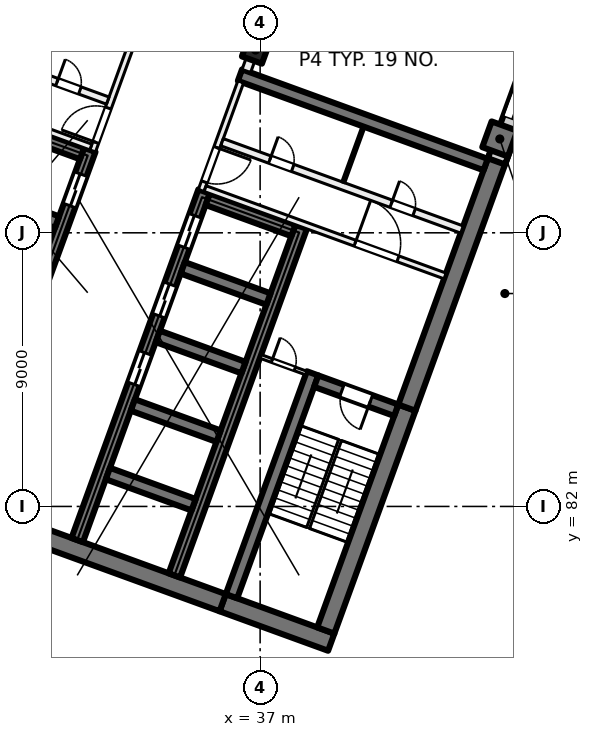
"""IFC4 building model, lengths in metres.
Left out: names, types, materials, properties, quantities, classifications, styles, units other than length and angle.
Written with IfcOpenShell. Run it as: python <this file> out.ifc"""

import sys

from ifc_helpers import new_model, si_unit, direction, frame, frame_2d, origin, origin_2d, place, context, subcontext, project, spatial, rectangle, extrude, element, fill, save


model = new_model("IFC4")
c1 = context("Model", 3, precision=1e-05, world=origin(), true_north=direction((0.0, 1.0)))
c2 = subcontext(c1, "Body", "Model", "MODEL_VIEW")
j1 = project(units=[si_unit("LENGTHUNIT", "METRE"), si_unit("PLANEANGLEUNIT", "RADIAN")], contexts=[c1])
p1 = place(None, origin())
s1 = spatial("IfcSite", under=j1, at=p1, CompositionType="ELEMENT")
p2 = place(p1, origin())
s2 = spatial("IfcBuilding", under=s1, at=p2, CompositionType="ELEMENT")
p3 = place(p2, frame((0.0, 0.0, 63.5)))
s3 = spatial("IfcBuildingStorey", under=s2, at=p3, CompositionType="ELEMENT", Elevation=63.5)
p4 = place(p3, frame((36.849, 97.011, 0.0), z_axis=(0.0, 0.0, 1.0), x_axis=(-0.342020143326, -0.939692620786, 0.0)))
e1 = element("IfcColumn", 1, at=p4, inside=s3, PredefinedType="COLUMN", context=c2, shape_type="SweptSolid", body=[
    extrude(rectangle(XDim=0.7, YDim=0.7, at=origin_2d()), origin(), (0.0, 0.0, 1.0), 4.0),
])
p5 = place(p3, frame((44.884, 94.087, 0.0), z_axis=(0.0, 0.0, 1.0), x_axis=(-0.342020143326, -0.939692620786, 0.0)))
e2 = element("IfcColumn", 2, at=p5, inside=s3, PredefinedType="COLUMN", context=c2, shape_type="SweptSolid", body=[
    extrude(rectangle(XDim=0.9, YDim=0.9, at=origin_2d()), origin(), (0.0, 0.0, 1.0), 4.0),
])
p6 = place(p3, frame((39.338, 77.535, 0.0), z_axis=(0.0, 0.0, 1.0), x_axis=(-0.939701471648, 0.341995824804, 0.0)))
e3 = element("IfcWall", 3, at=p6, inside=s3, PredefinedType="SHEAR", context=c2, shape_type="SweptSolid", body=[
    extrude(rectangle(XDim=3.8, YDim=0.6, at=frame_2d((1.9, 0.0))), origin(), (0.0, 0.0, 1.0), 4.0),
])
p7 = place(p3, frame((35.767, 78.835, 0.0), z_axis=(0.0, 0.0, 1.0), x_axis=(-0.939692894512, 0.342019391267, 0.0)))
e4 = element("IfcWall", 4, at=p7, inside=s3, PredefinedType="SHEAR", context=c2, shape_type="SweptSolid", body=[
    extrude(rectangle(XDim=14.4, YDim=0.6, at=frame_2d((7.2, 0.0))), origin(), (0.0, 0.0, 1.0), 4.0),
])
p8 = place(p3, frame((39.159, 77.92, 0.0), z_axis=(0.0, 0.0, 1.0), x_axis=(0.342016982193, 0.939693771338, 0.0)))
e5 = element("IfcWall", 5, at=p8, inside=s3, PredefinedType="SHEAR", context=c2, shape_type="SweptSolid", body=[
    extrude(rectangle(XDim=7.8, YDim=0.6, at=frame_2d((3.9, 0.0))), origin(), (0.0, 0.0, 1.0), 4.0),
])
p9 = place(p3, frame((41.827, 85.249, 0.0), z_axis=(0.0, 0.0, 1.0), x_axis=(0.342016162452, 0.939694069696, 0.0)))
e6 = element("IfcWall", 6, at=p9, inside=s3, PredefinedType="SHEAR", context=c2, shape_type="SweptSolid", body=[
    extrude(rectangle(XDim=8.9, YDim=0.6, at=frame_2d((4.45, 0.0))), origin(), (0.0, 0.0, 1.0), 4.0),
])
p10 = place(p3, frame((36.058, 79.048, 0.0), z_axis=(0.0, 0.0, 1.0), x_axis=(0.342016982193, 0.939693771338, 0.0)))
e7 = element("IfcWall", 7, at=p10, inside=s3, PredefinedType="SHEAR", context=c2, shape_type="SweptSolid", body=[
    extrude(rectangle(XDim=7.8, YDim=0.4, at=frame_2d((3.9, 0.0))), origin(), (0.0, 0.0, 1.0), 4.0),
])
p11 = place(p3, frame((41.476, 85.164, 0.0), z_axis=(0.0, 0.0, 1.0), x_axis=(-0.939678810556, 0.342058084236, 0.0)))
e8 = element("IfcWall", 8, at=p11, inside=s3, PredefinedType="SHEAR", context=c2, shape_type="SweptSolid", body=[
    extrude(rectangle(XDim=2.8, YDim=0.4, at=frame_2d((1.4, 0.0))), origin(), (0.0, 0.0, 1.0), 4.0),
])
p12 = place(p11, frame((0.9, 0.0, 0.0)))
e9 = element("IfcOpeningElement", 9, at=p12, cuts=e8, PredefinedType="OPENING", context=c2, shape_type="SweptSolid", body=[
    extrude(rectangle(XDim=1.0, YDim=2.1, at=frame_2d((0.5, 1.05))), frame((0.0, 0.21, 0.0), z_axis=(0.0, -1.0, 0.0), x_axis=(1.0, 0.0, 0.0)), (0.0, 0.0, 1.0), 0.42),
])
p13 = place(p3, frame((30.984, 80.895, 0.0), z_axis=(0.0, 0.0, 1.0), x_axis=(0.342021021735, 0.939692301071, 0.0)))
e10 = element("IfcWall", 10, at=p13, inside=s3, PredefinedType="SHEAR", context=c2, shape_type="SweptSolid", body=[
    extrude(rectangle(XDim=12.2, YDim=0.4, at=frame_2d((6.1, 0.0))), origin(), (0.0, 0.0, 1.0), 4.0),
])
p14 = place(p13, frame((5.45, 0.0, 0.0)))
e11 = element("IfcOpeningElement", 11, at=p14, cuts=e10, PredefinedType="OPENING", context=c2, shape_type="SweptSolid", body=[
    extrude(rectangle(XDim=1.1, YDim=2.1, at=frame_2d((0.55, 1.05))), frame((0.0, 0.21, 0.0), z_axis=(0.0, -1.0, 0.0), x_axis=(1.0, 0.0, 0.0)), (0.0, 0.0, 1.0), 0.42),
])
p15 = place(p13, frame((7.85, 0.0, 0.0)))
e12 = element("IfcOpeningElement", 12, at=p15, cuts=e10, PredefinedType="OPENING", context=c2, shape_type="SweptSolid", body=[
    extrude(rectangle(XDim=1.1, YDim=2.1, at=frame_2d((0.55, 1.05))), frame((0.0, 0.21, 0.0), z_axis=(0.0, -1.0, 0.0), x_axis=(1.0, 0.0, 0.0)), (0.0, 0.0, 1.0), 0.42),
])
p16 = place(p13, frame((10.25, 0.0, 0.0)))
e13 = element("IfcOpeningElement", 13, at=p16, cuts=e10, PredefinedType="OPENING", context=c2, shape_type="SweptSolid", body=[
    extrude(rectangle(XDim=1.1, YDim=2.1, at=frame_2d((0.55, 1.05))), frame((0.0, 0.21, 0.0), z_axis=(0.0, -1.0, 0.0), x_axis=(1.0, 0.0, 0.0)), (0.0, 0.0, 1.0), 0.42),
])
p17 = place(p3, frame((34.178, 79.732, 0.0), z_axis=(0.0, 0.0, 1.0), x_axis=(0.342014590177, 0.939694641948, 0.0)))
e14 = element("IfcWall", 14, at=p17, inside=s3, PredefinedType="SHEAR", context=c2, shape_type="SweptSolid", body=[
    extrude(rectangle(XDim=12.2, YDim=0.4, at=frame_2d((6.1, 0.0))), origin(), (0.0, 0.0, 1.0), 4.0),
])
for number, where, z_axis, x_axis in (
    (15, (34.812, 82.056, 0.0), (0.0, 0.0, 1.0), (-0.94, 0.342, 0.0)),
    (16, (35.632, 84.311, 0.0), (0.0, 0.0, 1.0), (-0.94, 0.342, 0.0)),
    (17, (36.453, 86.566, 0.0), (0.0, 0.0, 1.0), (-0.94, 0.342, 0.0)),
    (18, (37.274, 88.822, 0.0), (0.0, 0.0, 1.0), (-0.94, 0.342, 0.0)),
):
    element("IfcWall", number, at=place(p3, frame(where, z_axis=z_axis, x_axis=x_axis)), inside=s3, PredefinedType="SHEAR", context=c2, shape_type="SweptSolid", body=[
        extrude(rectangle(XDim=3.0, YDim=0.4, at=frame_2d((1.5, 0.0))), origin(), (0.0, 0.0, 1.0), 4.0),
    ])
p18 = place(p3, frame((38.095, 91.077, 0.0), z_axis=(0.0, 0.0, 1.0), x_axis=(-0.939676934218, 0.342063238742, 0.0)))
e19 = element("IfcWall", 19, at=p18, inside=s3, PredefinedType="SHEAR", context=c2, shape_type="SweptSolid", body=[
    extrude(rectangle(XDim=3.0, YDim=0.4, at=frame_2d((1.5, 0.0))), origin(), (0.0, 0.0, 1.0), 4.0),
])
p19 = place(p3, frame((27.225, 82.263, 0.0), z_axis=(0.0, 0.0, 1.0), x_axis=(0.342014590177, 0.939694641948, 0.0)))
e20 = element("IfcWall", 20, at=p19, inside=s3, PredefinedType="SHEAR", context=c2, shape_type="SweptSolid", body=[
    extrude(rectangle(XDim=12.2, YDim=0.4, at=frame_2d((6.1, 0.0))), origin(), (0.0, 0.0, 1.0), 4.0),
])
p20 = place(p19, frame((10.25, 0.0, 0.0)))
e21 = element("IfcOpeningElement", 21, at=p20, cuts=e20, PredefinedType="OPENING", context=c2, shape_type="SweptSolid", body=[
    extrude(rectangle(XDim=1.1, YDim=2.1, at=frame_2d((0.55, 1.05))), frame((0.0, 0.21, 0.0), z_axis=(0.0, -1.0, 0.0), x_axis=(1.0, 0.0, 0.0)), (0.0, 0.0, 1.0), 0.42),
])
p21 = place(p19, frame((0.7, 0.0, 0.0)))
e22 = element("IfcOpeningElement", 22, at=p21, cuts=e20, PredefinedType="OPENING", context=c2, shape_type="SweptSolid", body=[
    extrude(rectangle(XDim=0.8, YDim=2.1, at=frame_2d((0.4, 1.05))), frame((0.0, 0.21, 0.0), z_axis=(0.0, -1.0, 0.0), x_axis=(1.0, 0.0, 0.0)), (0.0, 0.0, 1.0), 0.42),
])
for number, where, z_axis, x_axis in (
    (23, (30.32, 91.353, 0.0), (0.0, 0.0, 1.0), (-0.94, 0.342, 0.0)),
    (24, (31.141, 93.608, 0.0), (0.0, 0.0, 1.0), (-0.94, 0.342, 0.0)),
):
    element("IfcWall", number, at=place(p3, frame(where, z_axis=z_axis, x_axis=x_axis)), inside=s3, PredefinedType="SHEAR", context=c2, shape_type="SweptSolid", body=[
        extrude(rectangle(XDim=3.0, YDim=0.4, at=frame_2d((1.5, 0.0))), origin(), (0.0, 0.0, 1.0), 4.0),
    ])
p22 = place(p3, frame((44.418, 93.245, 0.0), z_axis=(0.0, 0.0, 1.0), x_axis=(-0.93969060187, 0.342025690201, 0.0)))
e25 = element("IfcWall", 25, at=p22, inside=s3, PredefinedType="SHEAR", context=c2, shape_type="SweptSolid", body=[
    extrude(rectangle(XDim=8.6, YDim=0.4, at=frame_2d((4.3, 0.0))), origin(), (0.0, 0.0, 1.0), 4.0),
])
p23 = place(p3, frame((52.212, 113.783, 0.0), z_axis=(0.0, 0.0, 1.0), x_axis=(-0.34202521188, -0.939690775968, 0.0)))
e26 = element("IfcWall", 26, at=p23, inside=s3, PredefinedType="SOLIDWALL", context=c2, shape_type="SweptSolid", body=[
    extrude(rectangle(XDim=21.745, YDim=0.6, at=frame_2d((10.873, 0.0))), origin(), (0.0, 0.0, 1.0), 3.625),
])
p24 = place(p23, frame((3.765, 0.0, 0.9)))
e27 = element("IfcOpeningElement", 27, at=p24, cuts=e26, PredefinedType="OPENING", context=c2, shape_type="SweptSolid", body=[
    extrude(rectangle(XDim=3.0, YDim=2.4, at=frame_2d((1.5, 1.2))), frame((0.0, 0.31, 0.0), z_axis=(0.0, -1.0, 0.0), x_axis=(1.0, 0.0, 0.0)), (0.0, 0.0, 1.0), 0.62),
])
p25 = place(p23, frame((8.265, 0.0, 0.9)))
e28 = element("IfcOpeningElement", 28, at=p25, cuts=e26, PredefinedType="OPENING", context=c2, shape_type="SweptSolid", body=[
    extrude(rectangle(XDim=3.0, YDim=2.4, at=frame_2d((1.5, 1.2))), frame((0.0, 0.31, 0.0), z_axis=(0.0, -1.0, 0.0), x_axis=(1.0, 0.0, 0.0)), (0.0, 0.0, 1.0), 0.62),
])
p26 = place(p23, frame((12.765, 0.0, 0.9)))
e29 = element("IfcOpeningElement", 29, at=p26, cuts=e26, PredefinedType="OPENING", context=c2, shape_type="SweptSolid", body=[
    extrude(rectangle(XDim=3.0, YDim=2.4, at=frame_2d((1.5, 1.2))), frame((0.0, 0.31, 0.0), z_axis=(0.0, -1.0, 0.0), x_axis=(1.0, 0.0, 0.0)), (0.0, 0.0, 1.0), 0.62),
])
p27 = place(p23, frame((17.265, 0.0, 0.9)))
e30 = element("IfcOpeningElement", 30, at=p27, cuts=e26, PredefinedType="OPENING", context=c2, shape_type="SweptSolid", body=[
    extrude(rectangle(XDim=3.0, YDim=2.4, at=frame_2d((1.5, 1.2))), frame((0.0, 0.31, 0.0), z_axis=(0.0, -1.0, 0.0), x_axis=(1.0, 0.0, 0.0)), (0.0, 0.0, 1.0), 0.62),
])
p28 = place(p3, frame((31.491, 93.693, 0.0), z_axis=(0.0, 0.0, 1.0), x_axis=(0.341995824804, 0.939701471648, 0.0)))
e31 = element("IfcWall", 31, at=p28, inside=s3, PredefinedType="PARTITIONING", context=c2, shape_type="SweptSolid", body=[
    extrude(rectangle(XDim=3.8, YDim=0.2, at=frame_2d((1.9, 0.0))), origin(), (0.0, 0.0, 1.0), 3.625),
])
p29 = place(p28, frame((0.3, 0.0, 0.0)))
e32 = element("IfcOpeningElement", 32, at=p29, cuts=e31, PredefinedType="OPENING", context=c2, shape_type="SweptSolid", body=[
    extrude(rectangle(XDim=1.2, YDim=2.1, at=frame_2d((0.6, 1.05))), frame((0.0, 0.11, 0.0), z_axis=(0.0, -1.0, 0.0), x_axis=(1.0, 0.0, 0.0)), (0.0, 0.0, 1.0), 0.22),
])
p30 = place(p3, frame((23.538, 96.694, 0.0), z_axis=(0.0, 0.0, 1.0), x_axis=(0.939691552312, -0.342023078919, 0.0)))
e33 = element("IfcWall", 33, at=p30, inside=s3, PredefinedType="PARTITIONING", context=c2, shape_type="SweptSolid", body=[
    extrude(rectangle(XDim=8.4, YDim=0.2, at=frame_2d((4.2, 0.0))), origin(), (0.0, 0.0, 1.0), 3.625),
])
p31 = place(p30, frame((1.65, 0.0, 0.0)))
e34 = element("IfcOpeningElement", 34, at=p31, cuts=e33, PredefinedType="OPENING", context=c2, shape_type="SweptSolid", body=[
    extrude(rectangle(XDim=1.5, YDim=2.1, at=frame_2d((0.75, 1.05))), frame((0.0, 0.11, 0.0), z_axis=(0.0, -1.0, 0.0), x_axis=(1.0, 0.0, 0.0)), (0.0, 0.0, 1.0), 0.22),
])
p32 = place(p3, frame((24.094, 98.221, 0.0), z_axis=(0.0, 0.0, 1.0), x_axis=(0.939691552312, -0.342023078919, 0.0)))
e35 = element("IfcWall", 35, at=p32, inside=s3, PredefinedType="PARTITIONING", context=c2, shape_type="SweptSolid", body=[
    extrude(rectangle(XDim=8.4, YDim=0.25, at=frame_2d((4.2, 0.0))), origin(), (0.0, 0.0, 1.0), 3.625),
])
p33 = place(p32, frame((6.625, 0.0, 0.0)))
e36 = element("IfcOpeningElement", 36, at=p33, cuts=e35, PredefinedType="OPENING", context=c2, shape_type="SweptSolid", body=[
    extrude(rectangle(XDim=0.8, YDim=2.1, at=frame_2d((0.4, 1.05))), frame((0.0, 0.135, 0.0), z_axis=(0.0, -1.0, 0.0), x_axis=(1.0, 0.0, 0.0)), (0.0, 0.0, 1.0), 0.27),
])
p34 = place(p32, frame((2.375, 0.0, 0.0)))
e37 = element("IfcOpeningElement", 37, at=p34, cuts=e35, PredefinedType="OPENING", context=c2, shape_type="SweptSolid", body=[
    extrude(rectangle(XDim=0.8, YDim=2.1, at=frame_2d((0.4, 1.05))), frame((0.0, 0.135, 0.0), z_axis=(0.0, -1.0, 0.0), x_axis=(1.0, 0.0, 0.0)), (0.0, 0.0, 1.0), 0.27),
])
p35 = place(p3, frame((36.362, 95.964, 0.0), z_axis=(0.0, 0.0, 1.0), x_axis=(-0.341995824804, -0.939701471648, 0.0)))
e38 = element("IfcWall", 38, at=p35, inside=s3, PredefinedType="PARTITIONING", context=c2, shape_type="SweptSolid", body=[
    extrude(rectangle(XDim=3.8, YDim=0.2, at=frame_2d((1.9, 0.0))), origin(), (0.0, 0.0, 1.0), 3.625),
])
p36 = place(p35, frame((2.3, 0.0, 0.0)))
e39 = element("IfcOpeningElement", 39, at=p36, cuts=e38, PredefinedType="OPENING", context=c2, shape_type="SweptSolid", body=[
    extrude(rectangle(XDim=1.2, YDim=2.1, at=frame_2d((0.6, 1.05))), frame((0.0, 0.11, 0.0), z_axis=(0.0, -1.0, 0.0), x_axis=(1.0, 0.0, 0.0)), (0.0, 0.0, 1.0), 0.22),
])
p37 = place(p3, frame((35.19, 92.453, 0.0), z_axis=(0.0, 0.0, 1.0), x_axis=(0.939691552312, -0.342023078919, 0.0)))
e40 = element("IfcWall", 40, at=p37, inside=s3, PredefinedType="PARTITIONING", context=c2, shape_type="SweptSolid", body=[
    extrude(rectangle(XDim=8.4, YDim=0.2, at=frame_2d((4.2, 0.0))), origin(), (0.0, 0.0, 1.0), 3.625),
])
p38 = place(p37, frame((5.25, 0.0, 0.0)))
e41 = element("IfcOpeningElement", 41, at=p38, cuts=e40, PredefinedType="OPENING", context=c2, shape_type="SweptSolid", body=[
    extrude(rectangle(XDim=1.5, YDim=2.1, at=frame_2d((0.75, 1.05))), frame((0.0, 0.11, 0.0), z_axis=(0.0, -1.0, 0.0), x_axis=(1.0, 0.0, 0.0)), (0.0, 0.0, 1.0), 0.22),
])
p39 = place(p3, frame((35.746, 93.98, 0.0), z_axis=(0.0, 0.0, 1.0), x_axis=(0.939691552312, -0.342023078919, 0.0)))
e42 = element("IfcWall", 42, at=p39, inside=s3, PredefinedType="PARTITIONING", context=c2, shape_type="SweptSolid", body=[
    extrude(rectangle(XDim=8.4, YDim=0.25, at=frame_2d((4.2, 0.0))), origin(), (0.0, 0.0, 1.0), 3.625),
])
p40 = place(p39, frame((1.675, 0.0, 0.0)))
e43 = element("IfcOpeningElement", 43, at=p40, cuts=e42, PredefinedType="OPENING", context=c2, shape_type="SweptSolid", body=[
    extrude(rectangle(XDim=0.8, YDim=2.1, at=frame_2d((0.4, 1.05))), frame((0.0, 0.135, 0.0), z_axis=(0.0, -1.0, 0.0), x_axis=(1.0, 0.0, 0.0)), (0.0, 0.0, 1.0), 0.27),
])
p41 = place(p39, frame((5.925, 0.0, 0.0)))
e44 = element("IfcOpeningElement", 44, at=p41, cuts=e42, PredefinedType="OPENING", context=c2, shape_type="SweptSolid", body=[
    extrude(rectangle(XDim=0.8, YDim=2.1, at=frame_2d((0.4, 1.05))), frame((0.0, 0.135, 0.0), z_axis=(0.0, -1.0, 0.0), x_axis=(1.0, 0.0, 0.0)), (0.0, 0.0, 1.0), 0.27),
])
p42 = place(p3, frame((37.013, 86.935, 0.0), z_axis=(0.0, 0.0, 1.0), x_axis=(0.939659694648, -0.342110593602, 0.0)))
e45 = element("IfcWall", 45, at=p42, inside=s3, PredefinedType="PARTITIONING", context=c2, shape_type="SweptSolid", body=[
    extrude(rectangle(XDim=1.6, YDim=0.125, at=frame_2d((0.8, 0.0))), origin(), (0.0, 0.0, 1.0), 3.625),
])
p43 = place(p42, frame((0.4, 0.0, 0.0)))
e46 = element("IfcOpeningElement", 46, at=p43, cuts=e45, PredefinedType="OPENING", context=c2, shape_type="SweptSolid", body=[
    extrude(rectangle(XDim=0.8, YDim=2.1, at=frame_2d((0.4, 1.05))), frame((0.0, 0.073, 0.0), z_axis=(0.0, -1.0, 0.0), x_axis=(1.0, 0.0, 0.0)), (0.0, 0.0, 1.0), 0.145),
])
p44 = place(p3, frame((40.403, 94.494, 0.0), z_axis=(0.0, 0.0, 1.0), x_axis=(-0.342064742067, -0.939676386973, 0.0)))
e47 = element("IfcWall", 47, at=p44, inside=s3, PredefinedType="PARTITIONING", context=c2, shape_type="SweptSolid", body=[
    extrude(rectangle(XDim=1.95, YDim=0.1, at=frame_2d((0.975, 0.0))), origin(), (0.0, 0.0, 1.0), 3.625),
])
p45 = place(p3, frame((47.314, 125.909, 0.0), z_axis=(0.0, 0.0, 1.0), x_axis=(-0.342010770371, -0.939696032209, 0.0)))
e48 = element("IfcWall", 48, at=p45, inside=s3, PredefinedType="PARTITIONING", context=c2, shape_type="SweptSolid", body=[
    extrude(rectangle(XDim=31.485, YDim=0.3, at=frame_2d((15.742, 0.0))), origin(), (0.0, 0.0, 1.0), 3.625),
])
p46 = place(p45, frame((28.259, 0.0, 0.0)))
e49 = element("IfcOpeningElement", 49, at=p46, cuts=e48, PredefinedType="OPENING", context=c2, shape_type="SweptSolid", body=[
    extrude(rectangle(XDim=1.2, YDim=2.1, at=frame_2d((0.6, 1.05))), frame((0.0, 0.16, 0.0), z_axis=(0.0, -1.0, 0.0), x_axis=(1.0, 0.0, 0.0)), (0.0, 0.0, 1.0), 0.32),
])
p47 = place(p45, frame((23.484, 0.0, 0.0)))
e50 = element("IfcOpeningElement", 50, at=p47, cuts=e48, PredefinedType="OPENING", context=c2, shape_type="SweptSolid", body=[
    extrude(rectangle(XDim=1.0, YDim=2.1, at=frame_2d((0.5, 1.05))), frame((0.0, 0.16, 0.0), z_axis=(0.0, -1.0, 0.0), x_axis=(1.0, 0.0, 0.0)), (0.0, 0.0, 1.0), 0.32),
])
p48 = place(p45, frame((18.984, 0.0, 0.0)))
e51 = element("IfcOpeningElement", 51, at=p48, cuts=e48, PredefinedType="OPENING", context=c2, shape_type="SweptSolid", body=[
    extrude(rectangle(XDim=1.0, YDim=2.1, at=frame_2d((0.5, 1.05))), frame((0.0, 0.16, 0.0), z_axis=(0.0, -1.0, 0.0), x_axis=(1.0, 0.0, 0.0)), (0.0, 0.0, 1.0), 0.32),
])
p49 = place(p45, frame((14.385, 0.0, 0.0)))
e52 = element("IfcOpeningElement", 52, at=p49, cuts=e48, PredefinedType="OPENING", context=c2, shape_type="SweptSolid", body=[
    extrude(rectangle(XDim=1.2, YDim=2.1, at=frame_2d((0.6, 1.05))), frame((0.0, 0.16, 0.0), z_axis=(0.0, -1.0, 0.0), x_axis=(1.0, 0.0, 0.0)), (0.0, 0.0, 1.0), 0.32),
])
p50 = place(p45, frame((9.885, 0.0, 0.0)))
e53 = element("IfcOpeningElement", 53, at=p50, cuts=e48, PredefinedType="OPENING", context=c2, shape_type="SweptSolid", body=[
    extrude(rectangle(XDim=1.2, YDim=2.1, at=frame_2d((0.6, 1.05))), frame((0.0, 0.16, 0.0), z_axis=(0.0, -1.0, 0.0), x_axis=(1.0, 0.0, 0.0)), (0.0, 0.0, 1.0), 0.32),
])
p51 = place(p45, frame((5.384, 0.0, 0.0)))
e54 = element("IfcOpeningElement", 54, at=p51, cuts=e48, PredefinedType="OPENING", context=c2, shape_type="SweptSolid", body=[
    extrude(rectangle(XDim=1.2, YDim=2.1, at=frame_2d((0.6, 1.05))), frame((0.0, 0.16, 0.0), z_axis=(0.0, -1.0, 0.0), x_axis=(1.0, 0.0, 0.0)), (0.0, 0.0, 1.0), 0.32),
])
p52 = place(p27, origin())
e55 = element("IfcWindow", 55, at=p52, inside=s3, PartitioningType="SINGLE_PANEL", PredefinedType="WINDOW", context=c2, shape_type="SweptSolid", body=[
    extrude(rectangle(XDim=3.0, YDim=2.4, at=frame_2d((1.5, 1.2))), frame((0.0, 0.03, 0.0), z_axis=(0.0, -1.0, 0.0), x_axis=(1.0, 0.0, 0.0)), (0.0, 0.0, 1.0), 0.06),
])
fill(e30, e55)
p53 = place(p20, origin())
e56 = element("IfcDoor", 56, at=p53, inside=s3, OperationType="DOUBLE_DOOR_SLIDING", PredefinedType="DOOR", context=c2, shape_type="SweptSolid", body=[
    extrude(rectangle(XDim=1.1, YDim=2.1, at=frame_2d((0.55, 1.05))), frame((0.0, 0.025, 0.0), z_axis=(0.0, -1.0, 0.0), x_axis=(1.0, 0.0, 0.0)), (0.0, 0.0, 1.0), 0.05),
])
fill(e21, e56)
p54 = place(p14, origin())
e57 = element("IfcDoor", 57, at=p54, inside=s3, OperationType="DOUBLE_DOOR_SLIDING", PredefinedType="DOOR", context=c2, shape_type="SweptSolid", body=[
    extrude(rectangle(XDim=1.1, YDim=2.1, at=frame_2d((0.55, 1.05))), frame((0.0, 0.025, 0.0), z_axis=(0.0, -1.0, 0.0), x_axis=(1.0, 0.0, 0.0)), (0.0, 0.0, 1.0), 0.05),
])
fill(e11, e57)
p55 = place(p15, origin())
e58 = element("IfcDoor", 58, at=p55, inside=s3, OperationType="DOUBLE_DOOR_SLIDING", PredefinedType="DOOR", context=c2, shape_type="SweptSolid", body=[
    extrude(rectangle(XDim=1.1, YDim=2.1, at=frame_2d((0.55, 1.05))), frame((0.0, 0.025, 0.0), z_axis=(0.0, -1.0, 0.0), x_axis=(1.0, 0.0, 0.0)), (0.0, 0.0, 1.0), 0.05),
])
fill(e12, e58)
p56 = place(p16, origin())
e59 = element("IfcDoor", 59, at=p56, inside=s3, OperationType="DOUBLE_DOOR_SLIDING", PredefinedType="DOOR", context=c2, shape_type="SweptSolid", body=[
    extrude(rectangle(XDim=1.1, YDim=2.1, at=frame_2d((0.55, 1.05))), frame((0.0, 0.025, 0.0), z_axis=(0.0, -1.0, 0.0), x_axis=(1.0, 0.0, 0.0)), (0.0, 0.0, 1.0), 0.05),
])
fill(e13, e59)
p57 = place(p29, origin())
e60 = element("IfcDoor", 60, at=p57, inside=s3, OperationType="DOUBLE_DOOR_SINGLE_SWING", PredefinedType="DOOR", context=c2, shape_type="SweptSolid", body=[
    extrude(rectangle(XDim=1.2, YDim=2.1, at=frame_2d((0.6, 1.05))), frame((0.0, 0.025, 0.0), z_axis=(0.0, -1.0, 0.0), x_axis=(1.0, 0.0, 0.0)), (0.0, 0.0, 1.0), 0.05),
])
fill(e32, e60)
p58 = place(p33, origin())
e61 = element("IfcDoor", 61, at=p58, inside=s3, OperationType="SINGLE_SWING_LEFT", PredefinedType="DOOR", context=c2, shape_type="SweptSolid", body=[
    extrude(rectangle(XDim=0.8, YDim=2.1, at=frame_2d((0.4, 1.05))), frame((0.0, 0.025, 0.0), z_axis=(0.0, -1.0, 0.0), x_axis=(1.0, 0.0, 0.0)), (0.0, 0.0, 1.0), 0.05),
])
fill(e36, e61)
p59 = place(p36, origin())
e62 = element("IfcDoor", 62, at=p59, inside=s3, OperationType="DOUBLE_DOOR_SINGLE_SWING", PredefinedType="DOOR", context=c2, shape_type="SweptSolid", body=[
    extrude(rectangle(XDim=1.2, YDim=2.1, at=frame_2d((0.6, 1.05))), frame((0.0, 0.025, 0.0), z_axis=(0.0, -1.0, 0.0), x_axis=(1.0, 0.0, 0.0)), (0.0, 0.0, 1.0), 0.05),
])
fill(e39, e62)
p60 = place(p38, origin())
e63 = element("IfcDoor", 63, at=p60, inside=s3, OperationType="DOUBLE_DOOR_SINGLE_SWING", PredefinedType="DOOR", context=c2, shape_type="SweptSolid", body=[
    extrude(rectangle(XDim=1.5, YDim=2.1, at=frame_2d((0.75, 1.05))), frame((0.0, 0.025, 0.0), z_axis=(0.0, -1.0, 0.0), x_axis=(1.0, 0.0, 0.0)), (0.0, 0.0, 1.0), 0.05),
])
fill(e41, e63)
p61 = place(p12, origin())
e64 = element("IfcDoor", 64, at=p61, inside=s3, OperationType="SINGLE_SWING_RIGHT", PredefinedType="DOOR", context=c2, shape_type="SweptSolid", body=[
    extrude(rectangle(XDim=1.0, YDim=2.1, at=frame_2d((0.5, 1.05))), frame((0.0, 0.025, 0.0), z_axis=(0.0, -1.0, 0.0), x_axis=(1.0, 0.0, 0.0)), (0.0, 0.0, 1.0), 0.05),
])
fill(e9, e64)
p62 = place(p43, origin())
e65 = element("IfcDoor", 65, at=p62, inside=s3, OperationType="SINGLE_SWING_LEFT", PredefinedType="DOOR", context=c2, shape_type="SweptSolid", body=[
    extrude(rectangle(XDim=0.8, YDim=2.1, at=frame_2d((0.4, 1.05))), frame((0.0, 0.025, 0.0), z_axis=(0.0, -1.0, 0.0), x_axis=(1.0, 0.0, 0.0)), (0.0, 0.0, 1.0), 0.05),
])
fill(e46, e65)
p63 = place(p40, origin())
e66 = element("IfcDoor", 66, at=p63, inside=s3, OperationType="SINGLE_SWING_RIGHT", PredefinedType="DOOR", context=c2, shape_type="SweptSolid", body=[
    extrude(rectangle(XDim=0.8, YDim=2.1, at=frame_2d((0.4, 1.05))), frame((0.0, 0.025, 0.0), z_axis=(0.0, -1.0, 0.0), x_axis=(1.0, 0.0, 0.0)), (0.0, 0.0, 1.0), 0.05),
])
fill(e43, e66)
p64 = place(p41, origin())
e67 = element("IfcDoor", 67, at=p64, inside=s3, OperationType="SINGLE_SWING_LEFT", PredefinedType="DOOR", context=c2, shape_type="SweptSolid", body=[
    extrude(rectangle(XDim=0.8, YDim=2.1, at=frame_2d((0.4, 1.05))), frame((0.0, 0.025, 0.0), z_axis=(0.0, -1.0, 0.0), x_axis=(1.0, 0.0, 0.0)), (0.0, 0.0, 1.0), 0.05),
])
fill(e44, e67)
save(model, sys.argv[1])
